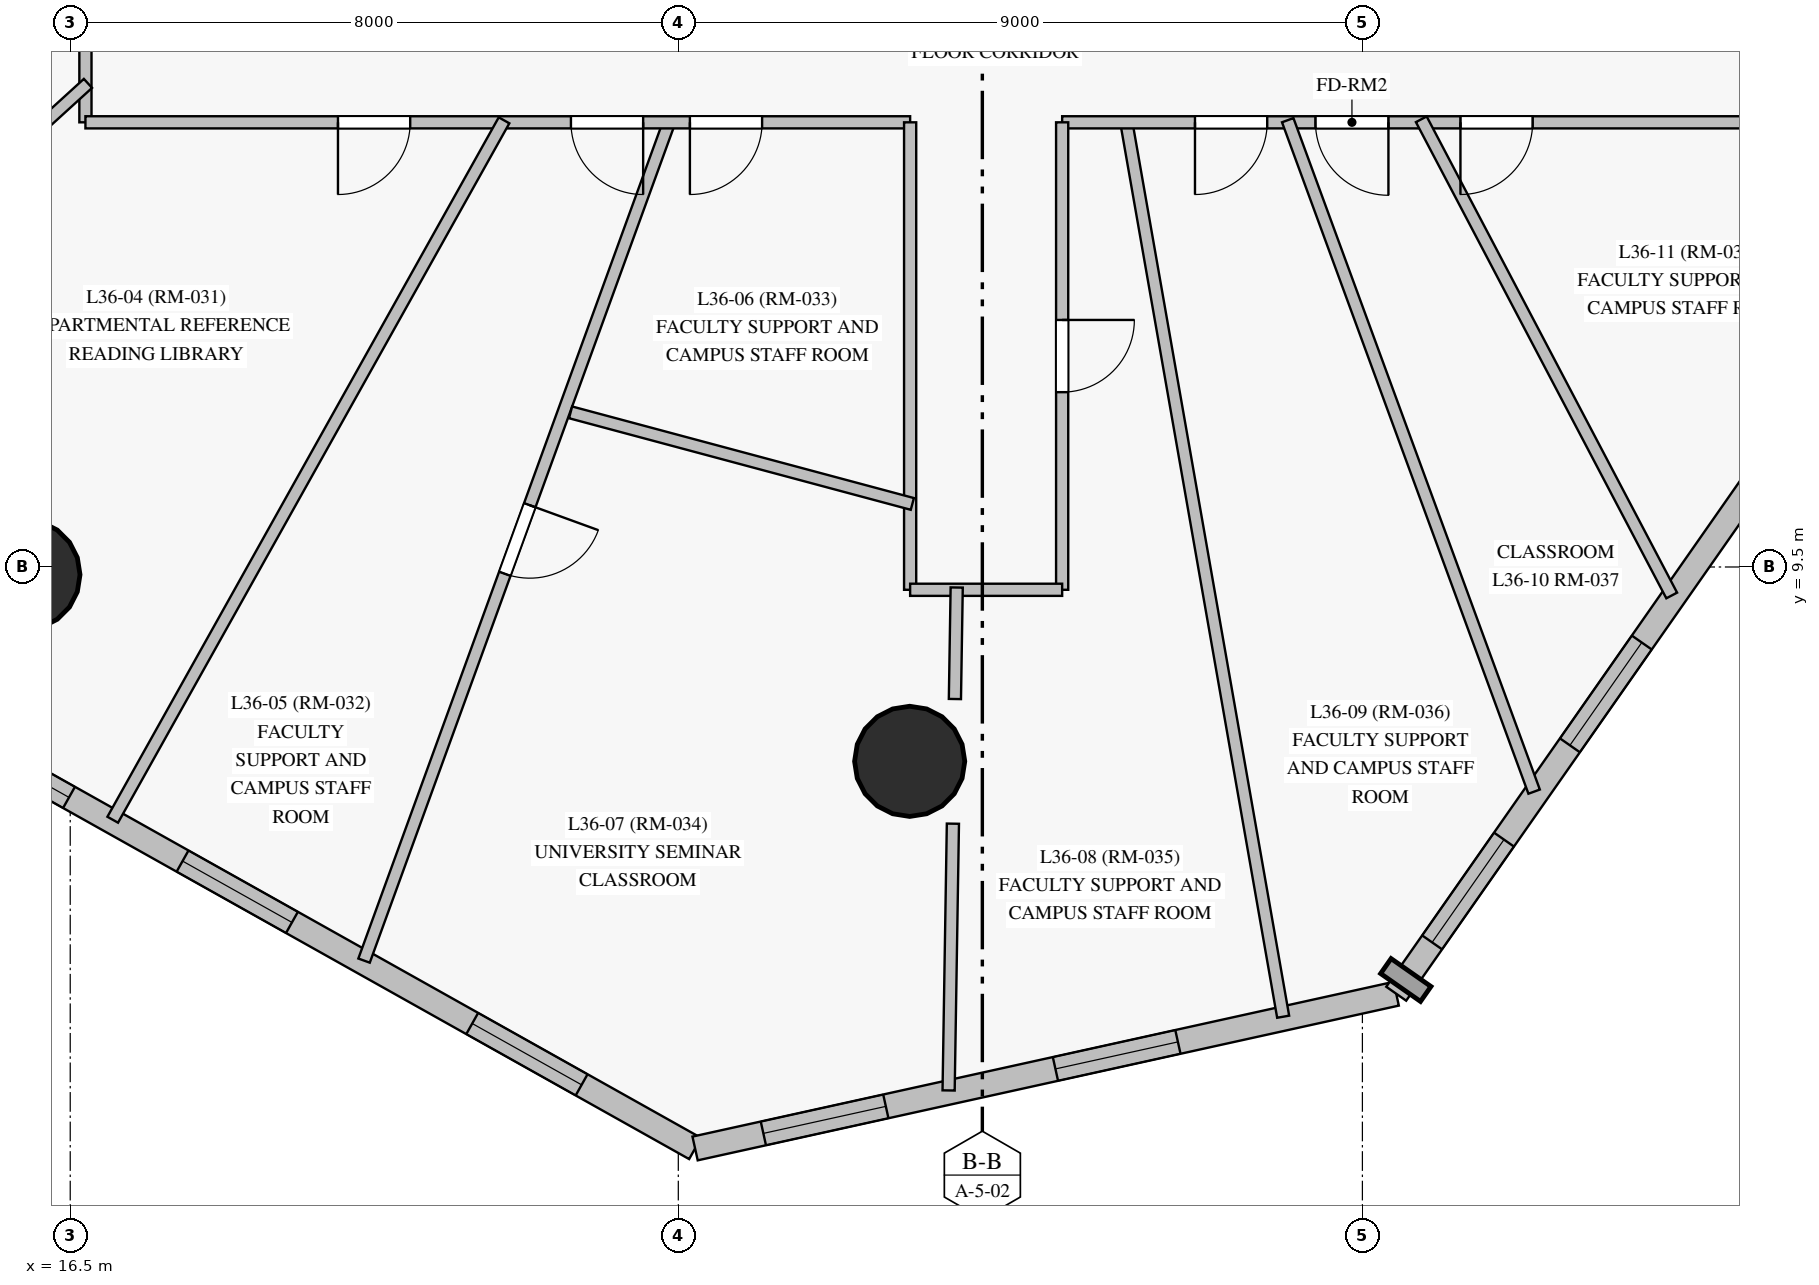
"""IFC4 building model, lengths in metres.
Left out: names, types, materials, properties, quantities, classifications, styles, units other than length and angle.
Written with IfcOpenShell. Run it as: python <this file> out.ifc"""

import sys

from ifc_helpers import new_model, si_unit, direction, frame, frame_2d, origin, origin_with_axes, origin_2d, place, context, subcontext, project, spatial, rectangle, circle, extrude, source, transform, mapped, element, fill, save


model = new_model("IFC4")
c1 = context("Model", 3, precision=1e-05, world=origin(), true_north=direction((0.0, 1.0)))
c2 = subcontext(c1, "Body", "Model", "MODEL_VIEW")
j1 = project(units=[si_unit("LENGTHUNIT", "METRE"), si_unit("PLANEANGLEUNIT", "RADIAN")], contexts=[c1])
p1 = place(None, origin())
s1 = spatial("IfcSite", under=j1, at=p1, CompositionType="ELEMENT")
p2 = place(p1, origin())
s2 = spatial("IfcBuilding", under=s1, at=p2, CompositionType="ELEMENT")
p3 = place(p2, frame((0.0, 0.0, 129.75)))
s3 = spatial("IfcBuildingStorey", under=s2, at=p3, CompositionType="ELEMENT", Elevation=129.75)
m1 = source(origin_with_axes(), c2, "Body", "SweptSolid", [
    extrude(circle(Radius=0.725, at=origin_2d()), origin(), (0.0, 0.0, 1.0), 3.05),
])
for number, where, z_axis, x_axis in (
    (1, (15.904, 9.399, 0.0), (0.0, 0.0, 1.0), (1.0, 0.0, 0.0)),
    (2, (27.544, 6.943, 0.0), (0.0, 0.0, 1.0), (1.0, 0.0, 0.0)),
):
    element("IfcColumn", number, at=place(p3, frame(where, z_axis=z_axis, x_axis=x_axis)), inside=s3, PredefinedType="COLUMN", context=c2, shape_type="MappedRepresentation", body=[
        mapped(m1, transform((0.0, 0.0, 0.0), scale=1.0)),
    ])
p4 = place(p3, frame((14.43, 7.621, 0.0), z_axis=(0.0, 0.0, 1.0), x_axis=(0.872233474303, -0.489089732365, 0.0)))
e3 = element("IfcWall", 3, at=p4, inside=s3, PredefinedType="SOLIDWALL", context=c2, shape_type="SweptSolid", body=[
    extrude(rectangle(XDim=11.799, YDim=0.32, at=frame_2d((5.899, 0.0))), origin(), (0.0, 0.0, 1.0), 2.825),
])
p5 = place(p4, frame((0.705, 0.0, 0.85)))
e4 = element("IfcOpeningElement", 4, at=p5, cuts=e3, PredefinedType="OPENING", context=c2, shape_type="SweptSolid", body=[
    extrude(rectangle(XDim=1.65, YDim=1.65, at=frame_2d((0.825, 0.825))), frame((0.0, 0.17, 0.0), z_axis=(0.0, -1.0, 0.0), x_axis=(1.0, 0.0, 0.0)), (0.0, 0.0, 1.0), 0.34),
])
p6 = place(p4, frame((4.068, 0.0, 0.85)))
e5 = element("IfcOpeningElement", 5, at=p6, cuts=e3, PredefinedType="OPENING", context=c2, shape_type="SweptSolid", body=[
    extrude(rectangle(XDim=1.65, YDim=1.65, at=frame_2d((0.825, 0.825))), frame((0.0, 0.17, 0.0), z_axis=(0.0, -1.0, 0.0), x_axis=(1.0, 0.0, 0.0)), (0.0, 0.0, 1.0), 0.34),
])
p7 = place(p4, frame((8.437, 0.0, 0.85)))
e6 = element("IfcOpeningElement", 6, at=p7, cuts=e3, PredefinedType="OPENING", context=c2, shape_type="SweptSolid", body=[
    extrude(rectangle(XDim=1.65, YDim=1.65, at=frame_2d((0.825, 0.825))), frame((0.0, 0.17, 0.0), z_axis=(0.0, -1.0, 0.0), x_axis=(1.0, 0.0, 0.0)), (0.0, 0.0, 1.0), 0.34),
])
p8 = place(p3, frame((24.721, 1.85, 0.0), z_axis=(0.0, 0.0, 1.0), x_axis=(0.976498022173, 0.215526361942, 0.0)))
e7 = element("IfcWall", 7, at=p8, inside=s3, PredefinedType="SOLIDWALL", context=c2, shape_type="SweptSolid", body=[
    extrude(rectangle(XDim=9.446, YDim=0.32, at=frame_2d((4.723, 0.0))), origin(), (0.0, 0.0, 1.0), 2.825),
])
p9 = place(p8, frame((0.92, 0.0, 0.85)))
e8 = element("IfcOpeningElement", 8, at=p9, cuts=e7, PredefinedType="OPENING", context=c2, shape_type="SweptSolid", body=[
    extrude(rectangle(XDim=1.65, YDim=1.65, at=frame_2d((0.825, 0.825))), frame((0.0, 0.17, 0.0), z_axis=(0.0, -1.0, 0.0), x_axis=(1.0, 0.0, 0.0)), (0.0, 0.0, 1.0), 0.34),
])
p10 = place(p8, frame((4.855, 0.0, 0.85)))
e9 = element("IfcOpeningElement", 9, at=p10, cuts=e7, PredefinedType="OPENING", context=c2, shape_type="SweptSolid", body=[
    extrude(rectangle(XDim=1.65, YDim=1.65, at=frame_2d((0.825, 0.825))), frame((0.0, 0.17, 0.0), z_axis=(0.0, -1.0, 0.0), x_axis=(1.0, 0.0, 0.0)), (0.0, 0.0, 1.0), 0.34),
])
p11 = place(p3, frame((33.945, 3.886, 0.0), z_axis=(0.0, 0.0, 1.0), x_axis=(0.573079618635, 0.819499695366, 0.0)))
e10 = element("IfcWall", 10, at=p11, inside=s3, PredefinedType="SOLIDWALL", context=c2, shape_type="SweptSolid", body=[
    extrude(rectangle(XDim=14.087, YDim=0.32, at=frame_2d((7.044, 0.0))), origin(), (0.0, 0.0, 1.0), 2.825),
])
p12 = place(p11, frame((0.824, 0.0, 0.85)))
e11 = element("IfcOpeningElement", 11, at=p12, cuts=e10, PredefinedType="OPENING", context=c2, shape_type="SweptSolid", body=[
    extrude(rectangle(XDim=1.65, YDim=1.65, at=frame_2d((0.825, 0.825))), frame((0.0, 0.17, 0.0), z_axis=(0.0, -1.0, 0.0), x_axis=(1.0, 0.0, 0.0)), (0.0, 0.0, 1.0), 0.34),
])
p13 = place(p11, frame((3.988, 0.0, 0.85)))
e12 = element("IfcOpeningElement", 12, at=p13, cuts=e10, PredefinedType="OPENING", context=c2, shape_type="SweptSolid", body=[
    extrude(rectangle(XDim=1.65, YDim=1.65, at=frame_2d((0.825, 0.825))), frame((0.0, 0.17, 0.0), z_axis=(0.0, -1.0, 0.0), x_axis=(1.0, 0.0, 0.0)), (0.0, 0.0, 1.0), 0.34),
])
p14 = place(p11, frame((8.827, 0.0, 0.85)))
e13 = element("IfcOpeningElement", 13, at=p14, cuts=e10, PredefinedType="OPENING", context=c2, shape_type="SweptSolid", body=[
    extrude(rectangle(XDim=1.65, YDim=1.65, at=frame_2d((0.825, 0.825))), frame((0.0, 0.17, 0.0), z_axis=(0.0, -1.0, 0.0), x_axis=(1.0, 0.0, 0.0)), (0.0, 0.0, 1.0), 0.34),
])
p15 = place(p3, frame((16.7, 15.35, 0.0), z_axis=(0.0, 0.0, 1.0), x_axis=(0.0, 1.0, 0.0)))
e14 = element("IfcWall", 14, at=p15, inside=s3, PredefinedType="PARTITIONING", context=c2, shape_type="SweptSolid", body=[
    extrude(rectangle(XDim=22.3, YDim=0.16, at=frame_2d((11.15, 0.0))), origin(), (0.0, 0.0, 1.0), 2.225),
])
p16 = place(p15, frame((10.675, 0.0, 0.0)))
e15 = element("IfcOpeningElement", 15, at=p16, cuts=e14, PredefinedType="OPENING", context=c2, shape_type="SweptSolid", body=[
    extrude(rectangle(XDim=0.95, YDim=2.15, at=frame_2d((0.475, 1.075))), frame((0.0, 0.09, 0.0), z_axis=(0.0, -1.0, 0.0), x_axis=(1.0, 0.0, 0.0)), (0.0, 0.0, 1.0), 0.18),
])
p17 = place(p15, frame((2.159, 0.0, 0.0)))
e16 = element("IfcOpeningElement", 16, at=p17, cuts=e14, PredefinedType="OPENING", context=c2, shape_type="SweptSolid", body=[
    extrude(rectangle(XDim=0.95, YDim=2.15, at=frame_2d((0.475, 1.075))), frame((0.0, 0.09, 0.0), z_axis=(0.0, -1.0, 0.0), x_axis=(1.0, 0.0, 0.0)), (0.0, 0.0, 1.0), 0.18),
])
p18 = place(p15, frame((14.02, 0.0, 0.0)))
e17 = element("IfcOpeningElement", 17, at=p18, cuts=e14, PredefinedType="OPENING", context=c2, shape_type="SweptSolid", body=[
    extrude(rectangle(XDim=0.95, YDim=2.15, at=frame_2d((0.475, 1.075))), frame((0.0, 0.09, 0.0), z_axis=(0.0, -1.0, 0.0), x_axis=(1.0, 0.0, 0.0)), (0.0, 0.0, 1.0), 0.18),
])
p19 = place(p3, frame((30.389, 15.379, 0.0), z_axis=(0.0, 0.0, 1.0), x_axis=(0.172707184879, -0.984973211966, 0.0)))
e18 = element("IfcWall", 18, at=p19, inside=s3, PredefinedType="PARTITIONING", context=c2, shape_type="SweptSolid", body=[
    extrude(rectangle(XDim=11.976, YDim=0.16, at=frame_2d((5.988, 0.0))), origin(), (0.0, 0.0, 1.0), 2.825),
])
p20 = place(p3, frame((24.389, 15.378, 0.0), z_axis=(0.0, 0.0, 1.0), x_axis=(-0.34195630746, -0.939715852685, 0.0)))
e19 = element("IfcWall", 19, at=p20, inside=s3, PredefinedType="PARTITIONING", context=c2, shape_type="SweptSolid", body=[
    extrude(rectangle(XDim=11.766, YDim=0.16, at=frame_2d((5.883, 0.0))), origin(), (0.0, 0.0, 1.0), 2.825),
])
p21 = place(p20, frame((5.39, 0.0, 0.0)))
e20 = element("IfcOpeningElement", 20, at=p21, cuts=e19, PredefinedType="OPENING", context=c2, shape_type="SweptSolid", body=[
    extrude(rectangle(XDim=0.96, YDim=2.15, at=frame_2d((0.48, 1.075))), frame((0.0, 0.09, 0.0), z_axis=(0.0, -1.0, 0.0), x_axis=(1.0, 0.0, 0.0)), (0.0, 0.0, 1.0), 0.18),
])
p22 = place(p3, frame((27.55, 15.35, 0.0), z_axis=(0.0, 0.0, 1.0), x_axis=(-1.0, 0.0, 0.0)))
e21 = element("IfcWall", 21, at=p22, inside=s3, PredefinedType="PARTITIONING", context=c2, shape_type="SweptSolid", body=[
    extrude(rectangle(XDim=10.85, YDim=0.16, at=frame_2d((5.425, 0.0))), origin(), (0.0, 0.0, 1.0), 2.325),
])
p23 = place(p22, frame((6.577, 0.0, 0.0)))
e22 = element("IfcOpeningElement", 22, at=p23, cuts=e21, PredefinedType="OPENING", context=c2, shape_type="SweptSolid", body=[
    extrude(rectangle(XDim=0.95, YDim=2.15, at=frame_2d((0.475, 1.075))), frame((0.0, 0.09, 0.0), z_axis=(0.0, -1.0, 0.0), x_axis=(1.0, 0.0, 0.0)), (0.0, 0.0, 1.0), 0.18),
])
p24 = place(p22, frame((3.512, 0.0, 0.0)))
e23 = element("IfcOpeningElement", 23, at=p24, cuts=e21, PredefinedType="OPENING", context=c2, shape_type="SweptSolid", body=[
    extrude(rectangle(XDim=0.95, YDim=2.15, at=frame_2d((0.475, 1.075))), frame((0.0, 0.09, 0.0), z_axis=(0.0, -1.0, 0.0), x_axis=(1.0, 0.0, 0.0)), (0.0, 0.0, 1.0), 0.18),
])
p25 = place(p22, frame((1.948, 0.0, 0.0)))
e24 = element("IfcOpeningElement", 24, at=p25, cuts=e21, PredefinedType="OPENING", context=c2, shape_type="SweptSolid", body=[
    extrude(rectangle(XDim=0.95, YDim=2.15, at=frame_2d((0.475, 1.075))), frame((0.0, 0.09, 0.0), z_axis=(0.0, -1.0, 0.0), x_axis=(1.0, 0.0, 0.0)), (0.0, 0.0, 1.0), 0.18),
])
p26 = place(p3, frame((40.2, 15.35, 0.0), z_axis=(0.0, 0.0, 1.0), x_axis=(-1.0, 0.0, 0.0)))
e25 = element("IfcWall", 25, at=p26, inside=s3, PredefinedType="PARTITIONING", context=c2, shape_type="SweptSolid", body=[
    extrude(rectangle(XDim=10.65, YDim=0.16, at=frame_2d((5.325, 0.0))), origin(), (0.0, 0.0, 1.0), 2.225),
])
p27 = place(p26, frame((7.952, 0.0, 0.0)))
e26 = element("IfcOpeningElement", 26, at=p27, cuts=e25, PredefinedType="OPENING", context=c2, shape_type="SweptSolid", body=[
    extrude(rectangle(XDim=0.95, YDim=2.15, at=frame_2d((0.475, 1.075))), frame((0.0, 0.09, 0.0), z_axis=(0.0, -1.0, 0.0), x_axis=(1.0, 0.0, 0.0)), (0.0, 0.0, 1.0), 0.18),
])
p28 = place(p26, frame((6.357, 0.0, 0.0)))
e27 = element("IfcOpeningElement", 27, at=p28, cuts=e25, PredefinedType="OPENING", context=c2, shape_type="SweptSolid", body=[
    extrude(rectangle(XDim=0.96, YDim=2.15, at=frame_2d((0.48, 1.075))), frame((0.0, 0.09, 0.0), z_axis=(0.0, -1.0, 0.0), x_axis=(1.0, 0.0, 0.0)), (0.0, 0.0, 1.0), 0.18),
])
p29 = place(p26, frame((4.46, 0.0, 0.0)))
e28 = element("IfcOpeningElement", 28, at=p29, cuts=e25, PredefinedType="OPENING", context=c2, shape_type="SweptSolid", body=[
    extrude(rectangle(XDim=0.95, YDim=2.15, at=frame_2d((0.475, 1.075))), frame((0.0, 0.09, 0.0), z_axis=(0.0, -1.0, 0.0), x_axis=(1.0, 0.0, 0.0)), (0.0, 0.0, 1.0), 0.18),
])
p30 = place(p3, frame((22.207, 15.376, 0.0), z_axis=(0.0, 0.0, 1.0), x_axis=(-0.488271237189, -0.872691926704, 0.0)))
e29 = element("IfcWall", 29, at=p30, inside=s3, PredefinedType="PARTITIONING", context=c2, shape_type="SweptSolid", body=[
    extrude(rectangle(XDim=10.544, YDim=0.16, at=frame_2d((5.272, 0.0))), origin(), (0.0, 0.0, 1.0), 2.825),
])
p31 = place(p3, frame((32.518, 15.378, 0.0), z_axis=(0.0, 0.0, 1.0), x_axis=(0.344526792854, -0.938776485115, 0.0)))
e30 = element("IfcWall", 30, at=p31, inside=s3, PredefinedType="PARTITIONING", context=c2, shape_type="SweptSolid", body=[
    extrude(rectangle(XDim=9.41, YDim=0.16, at=frame_2d((4.705, 0.0))), origin(), (0.0, 0.0, 1.0), 2.825),
])
p32 = place(p3, frame((34.275, 15.39, 0.0), z_axis=(0.0, 0.0, 1.0), x_axis=(0.465427973784, -0.885085759246, 0.0)))
e31 = element("IfcWall", 31, at=p32, inside=s3, PredefinedType="PARTITIONING", context=c2, shape_type="SweptSolid", body=[
    extrude(rectangle(XDim=7.078, YDim=0.16, at=frame_2d((3.539, 0.0))), origin(), (0.0, 0.0, 1.0), 2.825),
])
p33 = place(p3, frame((16.733, 15.862, 0.0), z_axis=(0.0, 0.0, 1.0), x_axis=(-0.739260079392, -0.673420028673, 0.0)))
e32 = element("IfcWall", 32, at=p33, inside=s3, PredefinedType="PARTITIONING", context=c2, shape_type="SweptSolid", body=[
    extrude(rectangle(XDim=6.356, YDim=0.16, at=frame_2d((3.178, 0.0))), origin(), (0.0, 0.0, 1.0), 2.825),
])
p34 = place(p3, frame((29.55, 15.35, 0.0), z_axis=(0.0, 0.0, 1.0), x_axis=(0.0, -1.0, 0.0)))
e33 = element("IfcWall", 33, at=p34, inside=s3, PredefinedType="PARTITIONING", context=c2, shape_type="SweptSolid", body=[
    extrude(rectangle(XDim=6.15, YDim=0.16, at=frame_2d((3.075, 0.0))), origin(), (0.0, 0.0, 1.0), 2.825),
])
p35 = place(p34, frame((2.6, 0.0, 0.0)))
e34 = element("IfcOpeningElement", 34, at=p35, cuts=e33, PredefinedType="OPENING", context=c2, shape_type="SweptSolid", body=[
    extrude(rectangle(XDim=0.95, YDim=2.15, at=frame_2d((0.475, 1.075))), frame((0.0, 0.09, 0.0), z_axis=(0.0, -1.0, 0.0), x_axis=(1.0, 0.0, 0.0)), (0.0, 0.0, 1.0), 0.18),
])
p36 = place(p3, frame((27.55, 9.2, 0.0), z_axis=(0.0, 0.0, 1.0), x_axis=(0.0, 1.0, 0.0)))
e35 = element("IfcWall", 35, at=p36, inside=s3, PredefinedType="PARTITIONING", context=c2, shape_type="SweptSolid", body=[
    extrude(rectangle(XDim=6.15, YDim=0.16, at=frame_2d((3.075, 0.0))), origin(), (0.0, 0.0, 1.0), 2.225),
])
p37 = place(p3, frame((27.579, 10.33, 0.0), z_axis=(0.0, 0.0, 1.0), x_axis=(-0.965933068413, 0.258792015614, 0.0)))
e36 = element("IfcWall", 36, at=p37, inside=s3, PredefinedType="PARTITIONING", context=c2, shape_type="SweptSolid", body=[
    extrude(rectangle(XDim=4.655, YDim=0.16, at=frame_2d((2.327, 0.0))), origin(), (0.0, 0.0, 1.0), 2.825),
])
p38 = place(p3, frame((28.113, 6.123, 0.0), z_axis=(0.0, 0.0, 1.0), x_axis=(-0.01606749079, -0.999870909538, 0.0)))
e37 = element("IfcWall", 37, at=p38, inside=s3, PredefinedType="PARTITIONING", context=c2, shape_type="SweptSolid", body=[
    extrude(rectangle(XDim=3.51, YDim=0.16, at=frame_2d((1.755, 0.0))), origin(), (0.0, 0.0, 1.0), 2.825),
])
p39 = place(p3, frame((29.55, 9.2, 0.0), z_axis=(0.0, 0.0, 1.0), x_axis=(-1.0, 0.0, 0.0)))
e38 = element("IfcWall", 38, at=p39, inside=s3, PredefinedType="PARTITIONING", context=c2, shape_type="SweptSolid", body=[
    extrude(rectangle(XDim=2.0, YDim=0.16, at=frame_2d((1.0, 0.0))), origin(), (0.0, 0.0, 1.0), 2.325),
])
p40 = place(p3, frame((28.163, 9.23, 0.0), z_axis=(0.0, 0.0, 1.0), x_axis=(-0.016140350208, -0.999869736063, 0.0)))
e39 = element("IfcWall", 39, at=p40, inside=s3, PredefinedType="PARTITIONING", context=c2, shape_type="SweptSolid", body=[
    extrude(rectangle(XDim=1.467, YDim=0.16, at=frame_2d((0.734, 0.0))), origin(), (0.0, 0.0, 1.0), 2.225),
])
m2 = source(origin_with_axes(), c2, "Body", "SweptSolid", [
    extrude(rectangle(XDim=1.65, YDim=1.65, at=frame_2d((0.825, 0.825))), frame((0.0, 0.03, 0.0), z_axis=(0.0, -1.0, 0.0), x_axis=(1.0, 0.0, 0.0)), (0.0, 0.0, 1.0), 0.06),
])
p41 = place(p5, origin())
e40 = element("IfcWindow", 40, at=p41, inside=s3, PartitioningType="SINGLE_PANEL", PredefinedType="WINDOW", context=c2, shape_type="MappedRepresentation", body=[
    mapped(m2, transform((0.0, 0.0, 0.0), scale=1.0)),
])
fill(e4, e40)
p42 = place(p6, origin())
e41 = element("IfcWindow", 41, at=p42, inside=s3, PartitioningType="SINGLE_PANEL", PredefinedType="WINDOW", context=c2, shape_type="MappedRepresentation", body=[
    mapped(m2, transform((0.0, 0.0, 0.0), scale=1.0)),
])
fill(e5, e41)
p43 = place(p7, origin())
e42 = element("IfcWindow", 42, at=p43, inside=s3, PartitioningType="SINGLE_PANEL", PredefinedType="WINDOW", context=c2, shape_type="MappedRepresentation", body=[
    mapped(m2, transform((0.0, 0.0, 0.0), scale=1.0)),
])
fill(e6, e42)
p44 = place(p9, origin())
e43 = element("IfcWindow", 43, at=p44, inside=s3, PartitioningType="SINGLE_PANEL", PredefinedType="WINDOW", context=c2, shape_type="MappedRepresentation", body=[
    mapped(m2, transform((0.0, 0.0, 0.0), scale=1.0)),
])
fill(e8, e43)
p45 = place(p10, origin())
e44 = element("IfcWindow", 44, at=p45, inside=s3, PartitioningType="SINGLE_PANEL", PredefinedType="WINDOW", context=c2, shape_type="MappedRepresentation", body=[
    mapped(m2, transform((0.0, 0.0, 0.0), scale=1.0)),
])
fill(e9, e44)
p46 = place(p12, origin())
e45 = element("IfcWindow", 45, at=p46, inside=s3, PartitioningType="SINGLE_PANEL", PredefinedType="WINDOW", context=c2, shape_type="MappedRepresentation", body=[
    mapped(m2, transform((0.0, 0.0, 0.0), scale=1.0)),
])
fill(e11, e45)
p47 = place(p13, origin())
e46 = element("IfcWindow", 46, at=p47, inside=s3, PartitioningType="SINGLE_PANEL", PredefinedType="WINDOW", context=c2, shape_type="MappedRepresentation", body=[
    mapped(m2, transform((0.0, 0.0, 0.0), scale=1.0)),
])
fill(e12, e46)
m3 = source(origin_with_axes(), c2, "Body", "SweptSolid", [
    extrude(rectangle(XDim=0.95, YDim=2.15, at=frame_2d((0.475, 1.075))), frame((0.0, 0.025, 0.0), z_axis=(0.0, -1.0, 0.0), x_axis=(1.0, 0.0, 0.0)), (0.0, 0.0, 1.0), 0.05),
])
p48 = place(p23, origin())
e47 = element("IfcDoor", 47, at=p48, inside=s3, OperationType="SINGLE_SWING_RIGHT", PredefinedType="DOOR", context=c2, shape_type="MappedRepresentation", body=[
    mapped(m3, transform((0.0, 0.0, 0.0), scale=1.0)),
])
fill(e22, e47)
p49 = place(p24, origin())
e48 = element("IfcDoor", 48, at=p49, inside=s3, OperationType="SINGLE_SWING_LEFT", PredefinedType="DOOR", context=c2, shape_type="MappedRepresentation", body=[
    mapped(m3, transform((0.0, 0.0, 0.0), scale=1.0)),
])
fill(e23, e48)
p50 = place(p25, origin())
e49 = element("IfcDoor", 49, at=p50, inside=s3, OperationType="SINGLE_SWING_RIGHT", PredefinedType="DOOR", context=c2, shape_type="MappedRepresentation", body=[
    mapped(m3, transform((0.0, 0.0, 0.0), scale=1.0)),
])
fill(e24, e49)
p51 = place(p35, origin())
e50 = element("IfcDoor", 50, at=p51, inside=s3, OperationType="SINGLE_SWING_LEFT", PredefinedType="DOOR", context=c2, shape_type="MappedRepresentation", body=[
    mapped(m3, transform((0.0, 0.0, 0.0), scale=1.0)),
])
fill(e34, e50)
p52 = place(p27, origin())
e51 = element("IfcDoor", 51, at=p52, inside=s3, OperationType="SINGLE_SWING_RIGHT", PredefinedType="DOOR", context=c2, shape_type="MappedRepresentation", body=[
    mapped(m3, transform((0.0, 0.0, 0.0), scale=1.0)),
])
fill(e26, e51)
m4 = source(origin_with_axes(), c2, "Body", "SweptSolid", [
    extrude(rectangle(XDim=0.96, YDim=2.15, at=frame_2d((0.48, 1.075))), frame((0.0, 0.025, 0.0), z_axis=(0.0, -1.0, 0.0), x_axis=(1.0, 0.0, 0.0)), (0.0, 0.0, 1.0), 0.05),
])
p53 = place(p28, origin())
e52 = element("IfcDoor", 52, at=p53, inside=s3, OperationType="SINGLE_SWING_LEFT", PredefinedType="DOOR", context=c2, shape_type="MappedRepresentation", body=[
    mapped(m4, transform((0.0, 0.0, 0.0), scale=1.0)),
])
fill(e27, e52)
p54 = place(p29, origin())
e53 = element("IfcDoor", 53, at=p54, inside=s3, OperationType="SINGLE_SWING_RIGHT", PredefinedType="DOOR", context=c2, shape_type="MappedRepresentation", body=[
    mapped(m3, transform((0.0, 0.0, 0.0), scale=1.0)),
])
fill(e28, e53)
p55 = place(p21, origin())
e54 = element("IfcDoor", 54, at=p55, inside=s3, OperationType="SINGLE_SWING_LEFT", PredefinedType="DOOR", context=c2, shape_type="MappedRepresentation", body=[
    mapped(m4, transform((0.0, 0.0, 0.0), scale=1.0)),
])
fill(e20, e54)
save(model, sys.argv[1])
